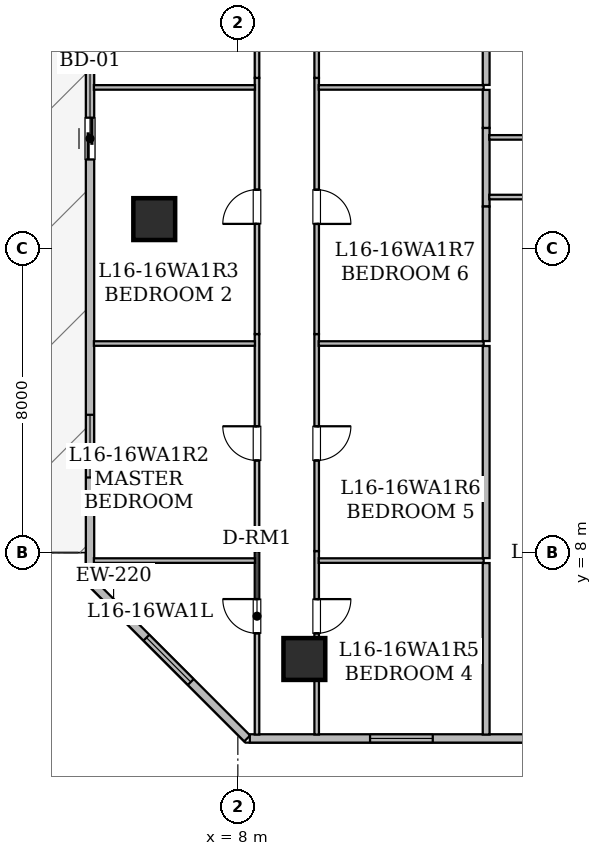
"""IFC4 building model, lengths in metres.
Left out: names, types, materials, properties, quantities, classifications, styles, units other than length and angle.
Written with IfcOpenShell. Run it as: python <this file> out.ifc"""

import sys

from ifc_helpers import new_model, si_unit, direction, frame, frame_2d, origin, origin_2d, place, context, subcontext, project, spatial, rectangle, hollow_rectangle, extrude, element, fill, save


model = new_model("IFC4")
c1 = context("Model", 3, precision=1e-05, world=origin(), true_north=direction((0.0, 1.0)))
c2 = subcontext(c1, "Body", "Model", "MODEL_VIEW")
j1 = project(units=[si_unit("LENGTHUNIT", "METRE"), si_unit("PLANEANGLEUNIT", "RADIAN")], contexts=[c1])
p1 = place(None, origin())
s1 = spatial("IfcSite", under=j1, at=p1, CompositionType="ELEMENT")
p2 = place(p1, origin())
s2 = spatial("IfcBuilding", under=s1, at=p2, CompositionType="ELEMENT")
p3 = place(p2, frame((0.0, 0.0, 66.15)))
s3 = spatial("IfcBuildingStorey", under=s2, at=p3, CompositionType="ELEMENT", Elevation=66.15)
for number, where, z_axis, x_axis in (
    (1, (9.75, 5.2, 0.0), (0.0, 0.0, 1.0), (1.0, 0.0, 0.0)),
    (2, (5.8, 16.775, 0.0), (0.0, 0.0, 1.0), (1.0, 0.0, 0.0)),
):
    element("IfcColumn", number, at=place(p3, frame(where, z_axis=z_axis, x_axis=x_axis)), inside=s3, PredefinedType="COLUMN", context=c2, shape_type="SweptSolid", body=[
        extrude(hollow_rectangle(XDim=1.1, YDim=1.1, WallThickness=0.055, at=origin_2d()), origin(), (0.0, 0.0, 1.0), 3.65),
    ])
p4 = place(p3, frame((8.246, 3.11, 0.0), z_axis=(0.0, 0.0, 1.0), x_axis=(-0.707106781187, 0.707106781187, 0.0)))
e3 = element("IfcWall", 3, at=p4, inside=s3, PredefinedType="STANDARD", context=c2, shape_type="SweptSolid", body=[
    extrude(rectangle(XDim=5.849, YDim=0.22, at=frame_2d((2.925, 0.0))), origin(), (0.0, 0.0, 1.0), 3.43),
])
p5 = place(p4, frame((2.1, 0.0, 0.85)))
e4 = element("IfcOpeningElement", 4, at=p5, cuts=e3, PredefinedType="OPENING", context=c2, shape_type="SweptSolid", body=[
    extrude(rectangle(XDim=1.65, YDim=1.55, at=frame_2d((0.825, 0.775))), frame((0.0, 0.12, 0.0), z_axis=(0.0, -1.0, 0.0), x_axis=(1.0, 0.0, 0.0)), (0.0, 0.0, 1.0), 0.24),
])
p6 = place(p3, frame((4.11, 7.317, 0.0), z_axis=(0.0, 0.0, 1.0), x_axis=(0.0, 1.0, 0.0)))
e5 = element("IfcWall", 5, at=p6, inside=s3, PredefinedType="STANDARD", context=c2, shape_type="SweptSolid", body=[
    extrude(rectangle(XDim=17.446, YDim=0.22, at=frame_2d((8.723, 0.0))), origin(), (0.0, 0.0, 1.0), 3.43),
])
p7 = place(p6, frame((11.027, 0.0, 0.0)))
e6 = element("IfcOpeningElement", 6, at=p7, cuts=e5, PredefinedType="OPENING", context=c2, shape_type="SweptSolid", body=[
    extrude(rectangle(XDim=1.1, YDim=2.2, at=frame_2d((0.55, 1.1))), frame((0.0, 0.12, 0.0), z_axis=(0.0, -1.0, 0.0), x_axis=(1.0, 0.0, 0.0)), (0.0, 0.0, 1.0), 0.24),
])
p8 = place(p6, frame((2.659, 0.0, 0.85)))
e7 = element("IfcOpeningElement", 7, at=p8, cuts=e5, PredefinedType="OPENING", context=c2, shape_type="SweptSolid", body=[
    extrude(rectangle(XDim=1.65, YDim=1.55, at=frame_2d((0.825, 0.775))), frame((0.0, 0.12, 0.0), z_axis=(0.0, -1.0, 0.0), x_axis=(1.0, 0.0, 0.0)), (0.0, 0.0, 1.0), 0.24),
])
p9 = place(p6, frame((13.967, 0.0, 0.85)))
e8 = element("IfcOpeningElement", 8, at=p9, cuts=e5, PredefinedType="OPENING", context=c2, shape_type="SweptSolid", body=[
    extrude(rectangle(XDim=1.65, YDim=1.55, at=frame_2d((0.825, 0.775))), frame((0.0, 0.12, 0.0), z_axis=(0.0, -1.0, 0.0), x_axis=(1.0, 0.0, 0.0)), (0.0, 0.0, 1.0), 0.24),
])
p10 = place(p3, frame((45.683, 3.11, 0.0), z_axis=(0.0, 0.0, 1.0), x_axis=(-1.0, 0.0, 0.0)))
e9 = element("IfcWall", 9, at=p10, inside=s3, PredefinedType="STANDARD", context=c2, shape_type="SweptSolid", body=[
    extrude(rectangle(XDim=37.368, YDim=0.22, at=frame_2d((18.684, 0.0))), origin(), (0.0, 0.0, 1.0), 3.43),
])
p11 = place(p10, frame((13.808, 0.0, 0.85)))
e10 = element("IfcOpeningElement", 10, at=p11, cuts=e9, PredefinedType="OPENING", context=c2, shape_type="SweptSolid", body=[
    extrude(rectangle(XDim=1.65, YDim=1.55, at=frame_2d((0.825, 0.775))), frame((0.0, 0.12, 0.0), z_axis=(0.0, -1.0, 0.0), x_axis=(1.0, 0.0, 0.0)), (0.0, 0.0, 1.0), 0.24),
])
p12 = place(p10, frame((32.554, 0.0, 0.85)))
e11 = element("IfcOpeningElement", 11, at=p12, cuts=e9, PredefinedType="OPENING", context=c2, shape_type="SweptSolid", body=[
    extrude(rectangle(XDim=1.65, YDim=1.55, at=frame_2d((0.825, 0.775))), frame((0.0, 0.12, 0.0), z_axis=(0.0, -1.0, 0.0), x_axis=(1.0, 0.0, 0.0)), (0.0, 0.0, 1.0), 0.24),
])
p13 = place(p10, frame((19.438, 0.0, 0.85)))
e12 = element("IfcOpeningElement", 12, at=p13, cuts=e9, PredefinedType="OPENING", context=c2, shape_type="SweptSolid", body=[
    extrude(rectangle(XDim=1.65, YDim=1.55, at=frame_2d((0.825, 0.775))), frame((0.0, 0.12, 0.0), z_axis=(0.0, -1.0, 0.0), x_axis=(1.0, 0.0, 0.0)), (0.0, 0.0, 1.0), 0.24),
])
p14 = place(p10, frame((21.869, 0.0, 0.8)))
e13 = element("IfcOpeningElement", 13, at=p14, cuts=e9, PredefinedType="OPENING", context=c2, shape_type="SweptSolid", body=[
    extrude(rectangle(XDim=1.2, YDim=1.5, at=frame_2d((0.6, 0.75))), frame((0.0, 0.12, 0.0), z_axis=(0.0, -1.0, 0.0), x_axis=(1.0, 0.0, 0.0)), (0.0, 0.0, 1.0), 0.24),
])
p15 = place(p10, frame((28.512, 0.0, 0.85)))
e14 = element("IfcOpeningElement", 14, at=p15, cuts=e9, PredefinedType="OPENING", context=c2, shape_type="SweptSolid", body=[
    extrude(rectangle(XDim=1.65, YDim=1.55, at=frame_2d((0.825, 0.775))), frame((0.0, 0.12, 0.0), z_axis=(0.0, -1.0, 0.0), x_axis=(1.0, 0.0, 0.0)), (0.0, 0.0, 1.0), 0.24),
])
p16 = place(p10, frame((24.567, 0.0, 0.85)))
e15 = element("IfcOpeningElement", 15, at=p16, cuts=e9, PredefinedType="OPENING", context=c2, shape_type="SweptSolid", body=[
    extrude(rectangle(XDim=1.65, YDim=1.55, at=frame_2d((0.825, 0.775))), frame((0.0, 0.12, 0.0), z_axis=(0.0, -1.0, 0.0), x_axis=(1.0, 0.0, 0.0)), (0.0, 0.0, 1.0), 0.24),
])
p17 = place(p10, frame((9.028, 0.0, 0.8)))
e16 = element("IfcOpeningElement", 16, at=p17, cuts=e9, PredefinedType="OPENING", context=c2, shape_type="SweptSolid", body=[
    extrude(rectangle(XDim=1.2, YDim=1.5, at=frame_2d((0.6, 0.75))), frame((0.0, 0.12, 0.0), z_axis=(0.0, -1.0, 0.0), x_axis=(1.0, 0.0, 0.0)), (0.0, 0.0, 1.0), 0.24),
])
p18 = place(p10, frame((5.753, 0.0, 0.85)))
e17 = element("IfcOpeningElement", 17, at=p18, cuts=e9, PredefinedType="OPENING", context=c2, shape_type="SweptSolid", body=[
    extrude(rectangle(XDim=1.65, YDim=1.55, at=frame_2d((0.825, 0.775))), frame((0.0, 0.12, 0.0), z_axis=(0.0, -1.0, 0.0), x_axis=(1.0, 0.0, 0.0)), (0.0, 0.0, 1.0), 0.24),
])
p19 = place(p10, frame((1.738, 0.0, 0.85)))
e18 = element("IfcOpeningElement", 18, at=p19, cuts=e9, PredefinedType="OPENING", context=c2, shape_type="SweptSolid", body=[
    extrude(rectangle(XDim=1.65, YDim=1.55, at=frame_2d((0.825, 0.775))), frame((0.0, 0.12, 0.0), z_axis=(0.0, -1.0, 0.0), x_axis=(1.0, 0.0, 0.0)), (0.0, 0.0, 1.0), 0.24),
])
p20 = place(p3, frame((8.504, 3.212, 0.0), z_axis=(0.0, 0.0, 1.0), x_axis=(0.0, 1.0, 0.0)))
e19 = element("IfcWall", 19, at=p20, inside=s3, PredefinedType="PARTITIONING", context=c2, shape_type="SweptSolid", body=[
    extrude(rectangle(XDim=4.828, YDim=0.12, at=frame_2d((2.414, 0.0))), origin(), (0.0, 0.0, 1.0), 2.803),
])
p21 = place(p20, frame((2.665, 0.0, 0.0)))
e20 = element("IfcOpeningElement", 20, at=p21, cuts=e19, PredefinedType="OPENING", context=c2, shape_type="SweptSolid", body=[
    extrude(rectangle(XDim=0.9, YDim=2.1, at=frame_2d((0.45, 1.05))), frame((0.0, 0.07, 0.0), z_axis=(0.0, -1.0, 0.0), x_axis=(1.0, 0.0, 0.0)), (0.0, 0.0, 1.0), 0.14),
])
p22 = place(p3, frame((8.504, 8.04, 0.0), z_axis=(0.0, 0.0, 1.0), x_axis=(0.0, 1.0, 0.0)))
e21 = element("IfcWall", 21, at=p22, inside=s3, PredefinedType="PARTITIONING", context=c2, shape_type="SweptSolid", body=[
    extrude(rectangle(XDim=5.71, YDim=0.12, at=frame_2d((2.855, 0.0))), origin(), (0.0, 0.0, 1.0), 2.803),
])
p23 = place(p22, frame((2.384, 0.0, 0.0)))
e22 = element("IfcOpeningElement", 22, at=p23, cuts=e21, PredefinedType="OPENING", context=c2, shape_type="SweptSolid", body=[
    extrude(rectangle(XDim=0.9, YDim=2.1, at=frame_2d((0.45, 1.05))), frame((0.0, 0.07, 0.0), z_axis=(0.0, -1.0, 0.0), x_axis=(1.0, 0.0, 0.0)), (0.0, 0.0, 1.0), 0.14),
])
p24 = place(p3, frame((8.504, 13.75, 0.0), z_axis=(0.0, 0.0, 1.0), x_axis=(0.0, 1.0, 0.0)))
e23 = element("IfcWall", 23, at=p24, inside=s3, PredefinedType="PARTITIONING", context=c2, shape_type="SweptSolid", body=[
    extrude(rectangle(XDim=6.74, YDim=0.12, at=frame_2d((3.37, 0.0))), origin(), (0.0, 0.0, 1.0), 2.647),
])
p25 = place(p24, frame((2.899, 0.0, 0.0)))
e24 = element("IfcOpeningElement", 24, at=p25, cuts=e23, PredefinedType="OPENING", context=c2, shape_type="SweptSolid", body=[
    extrude(rectangle(XDim=0.9, YDim=2.1, at=frame_2d((0.45, 1.05))), frame((0.0, 0.07, 0.0), z_axis=(0.0, -1.0, 0.0), x_axis=(1.0, 0.0, 0.0)), (0.0, 0.0, 1.0), 0.14),
])
p26 = place(p3, frame((8.504, 20.49, 0.0), z_axis=(0.0, 0.0, 1.0), x_axis=(0.0, 1.0, 0.0)))
e25 = element("IfcWall", 25, at=p26, inside=s3, PredefinedType="PARTITIONING", context=c2, shape_type="SweptSolid", body=[
    extrude(rectangle(XDim=10.25, YDim=0.12, at=frame_2d((5.125, 0.0))), origin(), (0.0, 0.0, 1.0), 3.065),
])
p27 = place(p3, frame((10.074, 8.04, 0.0), z_axis=(0.0, 0.0, 1.0), x_axis=(0.0, -1.0, 0.0)))
e26 = element("IfcWall", 26, at=p27, inside=s3, PredefinedType="PARTITIONING", context=c2, shape_type="SweptSolid", body=[
    extrude(rectangle(XDim=4.828, YDim=0.12, at=frame_2d((2.414, 0.0))), origin(), (0.0, 0.0, 1.0), 2.647),
])
p28 = place(p27, frame((1.264, 0.0, 0.0)))
e27 = element("IfcOpeningElement", 27, at=p28, cuts=e26, PredefinedType="OPENING", context=c2, shape_type="SweptSolid", body=[
    extrude(rectangle(XDim=0.9, YDim=2.1, at=frame_2d((0.45, 1.05))), frame((0.0, 0.07, 0.0), z_axis=(0.0, -1.0, 0.0), x_axis=(1.0, 0.0, 0.0)), (0.0, 0.0, 1.0), 0.14),
])
p29 = place(p3, frame((10.074, 13.75, 0.0), z_axis=(0.0, 0.0, 1.0), x_axis=(0.0, -1.0, 0.0)))
e28 = element("IfcWall", 28, at=p29, inside=s3, PredefinedType="PARTITIONING", context=c2, shape_type="SweptSolid", body=[
    extrude(rectangle(XDim=5.71, YDim=0.12, at=frame_2d((2.855, 0.0))), origin(), (0.0, 0.0, 1.0), 3.43),
])
p30 = place(p29, frame((2.426, 0.0, 0.0)))
e29 = element("IfcOpeningElement", 29, at=p30, cuts=e28, PredefinedType="OPENING", context=c2, shape_type="SweptSolid", body=[
    extrude(rectangle(XDim=0.9, YDim=2.1, at=frame_2d((0.45, 1.05))), frame((0.0, 0.07, 0.0), z_axis=(0.0, -1.0, 0.0), x_axis=(1.0, 0.0, 0.0)), (0.0, 0.0, 1.0), 0.14),
])
p31 = place(p3, frame((10.074, 20.49, 0.0), z_axis=(0.0, 0.0, 1.0), x_axis=(0.0, -1.0, 0.0)))
e30 = element("IfcWall", 30, at=p31, inside=s3, PredefinedType="PARTITIONING", context=c2, shape_type="SweptSolid", body=[
    extrude(rectangle(XDim=6.74, YDim=0.12, at=frame_2d((3.37, 0.0))), origin(), (0.0, 0.0, 1.0), 2.647),
])
p32 = place(p31, frame((2.942, 0.0, 0.0)))
e31 = element("IfcOpeningElement", 31, at=p32, cuts=e30, PredefinedType="OPENING", context=c2, shape_type="SweptSolid", body=[
    extrude(rectangle(XDim=0.9, YDim=2.1, at=frame_2d((0.45, 1.05))), frame((0.0, 0.07, 0.0), z_axis=(0.0, -1.0, 0.0), x_axis=(1.0, 0.0, 0.0)), (0.0, 0.0, 1.0), 0.14),
])
p33 = place(p3, frame((10.074, 28.14, 0.0), z_axis=(0.0, 0.0, 1.0), x_axis=(0.0, -1.0, 0.0)))
e32 = element("IfcWall", 32, at=p33, inside=s3, PredefinedType="PARTITIONING", context=c2, shape_type="SweptSolid", body=[
    extrude(rectangle(XDim=7.65, YDim=0.12, at=frame_2d((3.825, 0.0))), origin(), (0.0, 0.0, 1.0), 3.065),
])
p34 = place(p33, frame((3.375, 0.0, 0.0)))
e33 = element("IfcOpeningElement", 33, at=p34, cuts=e32, PredefinedType="OPENING", context=c2, shape_type="SweptSolid", body=[
    extrude(rectangle(XDim=0.9, YDim=2.1, at=frame_2d((0.45, 1.05))), frame((0.0, 0.07, 0.0), z_axis=(0.0, -1.0, 0.0), x_axis=(1.0, 0.0, 0.0)), (0.0, 0.0, 1.0), 0.14),
])
p35 = place(p3, frame((4.212, 7.79, 0.0), z_axis=(0.0, 0.0, 1.0), x_axis=(1.0, 0.0, 0.0)))
e34 = element("IfcWall", 34, at=p35, inside=s3, PredefinedType="PARTITIONING", context=c2, shape_type="SweptSolid", body=[
    extrude(rectangle(XDim=4.238, YDim=0.12, at=frame_2d((2.119, 0.0))), origin(), (0.0, 0.0, 1.0), 3.43),
])
for number, where, z_axis, x_axis in (
    (35, (4.212, 13.501, 0.0), (0.0, 0.0, 1.0), (1.0, 0.0, 0.0)),
    (36, (4.212, 20.24, 0.0), (0.0, 0.0, 1.0), (1.0, 0.0, 0.0)),
):
    element("IfcWall", number, at=place(p3, frame(where, z_axis=z_axis, x_axis=x_axis)), inside=s3, PredefinedType="PARTITIONING", context=c2, shape_type="SweptSolid", body=[
        extrude(rectangle(XDim=4.238, YDim=0.12, at=frame_2d((2.119, 0.0))), origin(), (0.0, 0.0, 1.0), 2.803),
    ])
p36 = place(p3, frame((10.128, 7.79, 0.0), z_axis=(0.0, 0.0, 1.0), x_axis=(1.0, 0.0, 0.0)))
e37 = element("IfcWall", 37, at=p36, inside=s3, PredefinedType="PARTITIONING", context=c2, shape_type="SweptSolid", body=[
    extrude(rectangle(XDim=4.341, YDim=0.12, at=frame_2d((2.17, 0.0))), origin(), (0.0, 0.0, 1.0), 2.647),
])
p37 = place(p3, frame((14.534, 7.725, 0.0), z_axis=(0.0, 0.0, 1.0), x_axis=(0.0, -1.0, 0.0)))
e38 = element("IfcWall", 38, at=p37, inside=s3, PredefinedType="STANDARD", context=c2, shape_type="SweptSolid", body=[
    extrude(rectangle(XDim=4.513, YDim=0.18, at=frame_2d((2.257, 0.0))), origin(), (0.0, 0.0, 1.0), 2.803),
])
p38 = place(p3, frame((10.128, 13.501, 0.0), z_axis=(0.0, 0.0, 1.0), x_axis=(1.0, 0.0, 0.0)))
e39 = element("IfcWall", 39, at=p38, inside=s3, PredefinedType="PARTITIONING", context=c2, shape_type="SweptSolid", body=[
    extrude(rectangle(XDim=4.341, YDim=0.12, at=frame_2d((2.17, 0.0))), origin(), (0.0, 0.0, 1.0), 3.43),
])
p39 = place(p3, frame((14.534, 13.436, 0.0), z_axis=(0.0, 0.0, 1.0), x_axis=(0.0, -1.0, 0.0)))
e40 = element("IfcWall", 40, at=p39, inside=s3, PredefinedType="STANDARD", context=c2, shape_type="SweptSolid", body=[
    extrude(rectangle(XDim=5.581, YDim=0.18, at=frame_2d((2.791, 0.0))), origin(), (0.0, 0.0, 1.0), 2.647),
])
p40 = place(p3, frame((10.128, 20.24, 0.0), z_axis=(0.0, 0.0, 1.0), x_axis=(1.0, 0.0, 0.0)))
e41 = element("IfcWall", 41, at=p40, inside=s3, PredefinedType="PARTITIONING", context=c2, shape_type="SweptSolid", body=[
    extrude(rectangle(XDim=4.341, YDim=0.12, at=frame_2d((2.17, 0.0))), origin(), (0.0, 0.0, 1.0), 3.43),
])
p41 = place(p3, frame((14.534, 19.174, 0.0), z_axis=(0.0, 0.0, 1.0), x_axis=(0.0, -1.0, 0.0)))
e42 = element("IfcWall", 42, at=p41, inside=s3, PredefinedType="STANDARD", context=c2, shape_type="SweptSolid", body=[
    extrude(rectangle(XDim=2.068, YDim=0.18, at=frame_2d((1.034, 0.0))), origin(), (0.0, 0.0, 1.0), 2.647),
])
p42 = place(p3, frame((14.534, 17.106, 0.0), z_axis=(0.0, 0.0, 1.0), x_axis=(0.0, -1.0, 0.0)))
e43 = element("IfcWall", 43, at=p42, inside=s3, PredefinedType="STANDARD", context=c2, shape_type="SweptSolid", body=[
    extrude(rectangle(XDim=3.54, YDim=0.18, at=frame_2d((1.77, 0.0))), origin(), (0.0, 0.0, 1.0), 3.43),
])
p43 = place(p3, frame((14.534, 20.175, 0.0), z_axis=(0.0, 0.0, 1.0), x_axis=(0.0, -1.0, 0.0)))
e44 = element("IfcWall", 44, at=p43, inside=s3, PredefinedType="STANDARD", context=c2, shape_type="SweptSolid", body=[
    extrude(rectangle(XDim=1.001, YDim=0.18, at=frame_2d((0.5, 0.0))), origin(), (0.0, 0.0, 1.0), 3.43),
])
p44 = place(p3, frame((14.534, 28.01, 0.0), z_axis=(0.0, 0.0, 1.0), x_axis=(0.0, -1.0, 0.0)))
e45 = element("IfcWall", 45, at=p44, inside=s3, PredefinedType="STANDARD", context=c2, shape_type="SweptSolid", body=[
    extrude(rectangle(XDim=7.705, YDim=0.18, at=frame_2d((3.853, 0.0))), origin(), (0.0, 0.0, 1.0), 3.065),
])
p45 = place(p3, frame((18.407, 17.355, 0.0), z_axis=(0.0, 0.0, 1.0), x_axis=(-1.0, 0.0, 0.0)))
e46 = element("IfcWall", 46, at=p45, inside=s3, PredefinedType="PARTITIONING", context=c2, shape_type="SweptSolid", body=[
    extrude(rectangle(XDim=3.791, YDim=0.12, at=frame_2d((1.896, 0.0))), origin(), (0.0, 0.0, 1.0), 2.647),
])
p46 = place(p45, frame((1.466, 0.0, 0.0)))
e47 = element("IfcOpeningElement", 47, at=p46, cuts=e46, PredefinedType="OPENING", context=c2, shape_type="SweptSolid", body=[
    extrude(rectangle(XDim=0.9, YDim=2.1, at=frame_2d((0.45, 1.05))), frame((0.0, 0.07, 0.0), z_axis=(0.0, -1.0, 0.0), x_axis=(1.0, 0.0, 0.0)), (0.0, 0.0, 1.0), 0.14),
])
p47 = place(p3, frame((14.616, 18.925, 0.0), z_axis=(0.0, 0.0, 1.0), x_axis=(1.0, 0.0, 0.0)))
e48 = element("IfcWall", 48, at=p47, inside=s3, PredefinedType="PARTITIONING", context=c2, shape_type="SweptSolid", body=[
    extrude(rectangle(XDim=3.791, YDim=0.12, at=frame_2d((1.896, 0.0))), origin(), (0.0, 0.0, 1.0), 2.647),
])
p48 = place(p47, frame((1.425, 0.0, 0.0)))
e49 = element("IfcOpeningElement", 49, at=p48, cuts=e48, PredefinedType="OPENING", context=c2, shape_type="SweptSolid", body=[
    extrude(rectangle(XDim=0.9, YDim=2.1, at=frame_2d((0.45, 1.05))), frame((0.0, 0.07, 0.0), z_axis=(0.0, -1.0, 0.0), x_axis=(1.0, 0.0, 0.0)), (0.0, 0.0, 1.0), 0.14),
])
p49 = place(p7, origin())
e50 = element("IfcDoor", 50, at=p49, inside=s3, OperationType="SLIDING_TO_LEFT", PredefinedType="DOOR", context=c2, shape_type="SweptSolid", body=[
    extrude(rectangle(XDim=1.1, YDim=2.2, at=frame_2d((0.55, 1.1))), frame((0.0, 0.025, 0.0), z_axis=(0.0, -1.0, 0.0), x_axis=(1.0, 0.0, 0.0)), (0.0, 0.0, 1.0), 0.05),
])
fill(e6, e50)
p50 = place(p5, origin())
e51 = element("IfcWindow", 51, at=p50, inside=s3, PartitioningType="SINGLE_PANEL", PredefinedType="WINDOW", context=c2, shape_type="SweptSolid", body=[
    extrude(rectangle(XDim=1.65, YDim=1.55, at=frame_2d((0.825, 0.775))), frame((0.0, 0.03, 0.0), z_axis=(0.0, -1.0, 0.0), x_axis=(1.0, 0.0, 0.0)), (0.0, 0.0, 1.0), 0.06),
])
fill(e4, e51)
p51 = place(p8, origin())
e52 = element("IfcWindow", 52, at=p51, inside=s3, PartitioningType="SINGLE_PANEL", PredefinedType="WINDOW", context=c2, shape_type="SweptSolid", body=[
    extrude(rectangle(XDim=1.65, YDim=1.55, at=frame_2d((0.825, 0.775))), frame((0.0, 0.03, 0.0), z_axis=(0.0, -1.0, 0.0), x_axis=(1.0, 0.0, 0.0)), (0.0, 0.0, 1.0), 0.06),
])
fill(e7, e52)
p52 = place(p12, origin())
e53 = element("IfcWindow", 53, at=p52, inside=s3, PartitioningType="SINGLE_PANEL", PredefinedType="WINDOW", context=c2, shape_type="SweptSolid", body=[
    extrude(rectangle(XDim=1.65, YDim=1.55, at=frame_2d((0.825, 0.775))), frame((0.0, 0.03, 0.0), z_axis=(0.0, -1.0, 0.0), x_axis=(1.0, 0.0, 0.0)), (0.0, 0.0, 1.0), 0.06),
])
fill(e11, e53)
p53 = place(p21, origin())
e54 = element("IfcDoor", 54, at=p53, inside=s3, OperationType="SINGLE_SWING_RIGHT", PredefinedType="DOOR", context=c2, shape_type="SweptSolid", body=[
    extrude(rectangle(XDim=0.9, YDim=2.1, at=frame_2d((0.45, 1.05))), frame((0.0, 0.025, 0.0), z_axis=(0.0, -1.0, 0.0), x_axis=(1.0, 0.0, 0.0)), (0.0, 0.0, 1.0), 0.05),
])
fill(e20, e54)
p54 = place(p23, origin())
e55 = element("IfcDoor", 55, at=p54, inside=s3, OperationType="SINGLE_SWING_RIGHT", PredefinedType="DOOR", context=c2, shape_type="SweptSolid", body=[
    extrude(rectangle(XDim=0.9, YDim=2.1, at=frame_2d((0.45, 1.05))), frame((0.0, 0.025, 0.0), z_axis=(0.0, -1.0, 0.0), x_axis=(1.0, 0.0, 0.0)), (0.0, 0.0, 1.0), 0.05),
])
fill(e22, e55)
p55 = place(p25, origin())
e56 = element("IfcDoor", 56, at=p55, inside=s3, OperationType="SINGLE_SWING_LEFT", PredefinedType="DOOR", context=c2, shape_type="SweptSolid", body=[
    extrude(rectangle(XDim=0.9, YDim=2.1, at=frame_2d((0.45, 1.05))), frame((0.0, 0.025, 0.0), z_axis=(0.0, -1.0, 0.0), x_axis=(1.0, 0.0, 0.0)), (0.0, 0.0, 1.0), 0.05),
])
fill(e24, e56)
p56 = place(p28, origin())
e57 = element("IfcDoor", 57, at=p56, inside=s3, OperationType="SINGLE_SWING_LEFT", PredefinedType="DOOR", context=c2, shape_type="SweptSolid", body=[
    extrude(rectangle(XDim=0.9, YDim=2.1, at=frame_2d((0.45, 1.05))), frame((0.0, 0.025, 0.0), z_axis=(0.0, -1.0, 0.0), x_axis=(1.0, 0.0, 0.0)), (0.0, 0.0, 1.0), 0.05),
])
fill(e27, e57)
p57 = place(p30, origin())
e58 = element("IfcDoor", 58, at=p57, inside=s3, OperationType="SINGLE_SWING_LEFT", PredefinedType="DOOR", context=c2, shape_type="SweptSolid", body=[
    extrude(rectangle(XDim=0.9, YDim=2.1, at=frame_2d((0.45, 1.05))), frame((0.0, 0.025, 0.0), z_axis=(0.0, -1.0, 0.0), x_axis=(1.0, 0.0, 0.0)), (0.0, 0.0, 1.0), 0.05),
])
fill(e29, e58)
p58 = place(p32, origin())
e59 = element("IfcDoor", 59, at=p58, inside=s3, OperationType="SINGLE_SWING_RIGHT", PredefinedType="DOOR", context=c2, shape_type="SweptSolid", body=[
    extrude(rectangle(XDim=0.9, YDim=2.1, at=frame_2d((0.45, 1.05))), frame((0.0, 0.025, 0.0), z_axis=(0.0, -1.0, 0.0), x_axis=(1.0, 0.0, 0.0)), (0.0, 0.0, 1.0), 0.05),
])
fill(e31, e59)
save(model, sys.argv[1])
